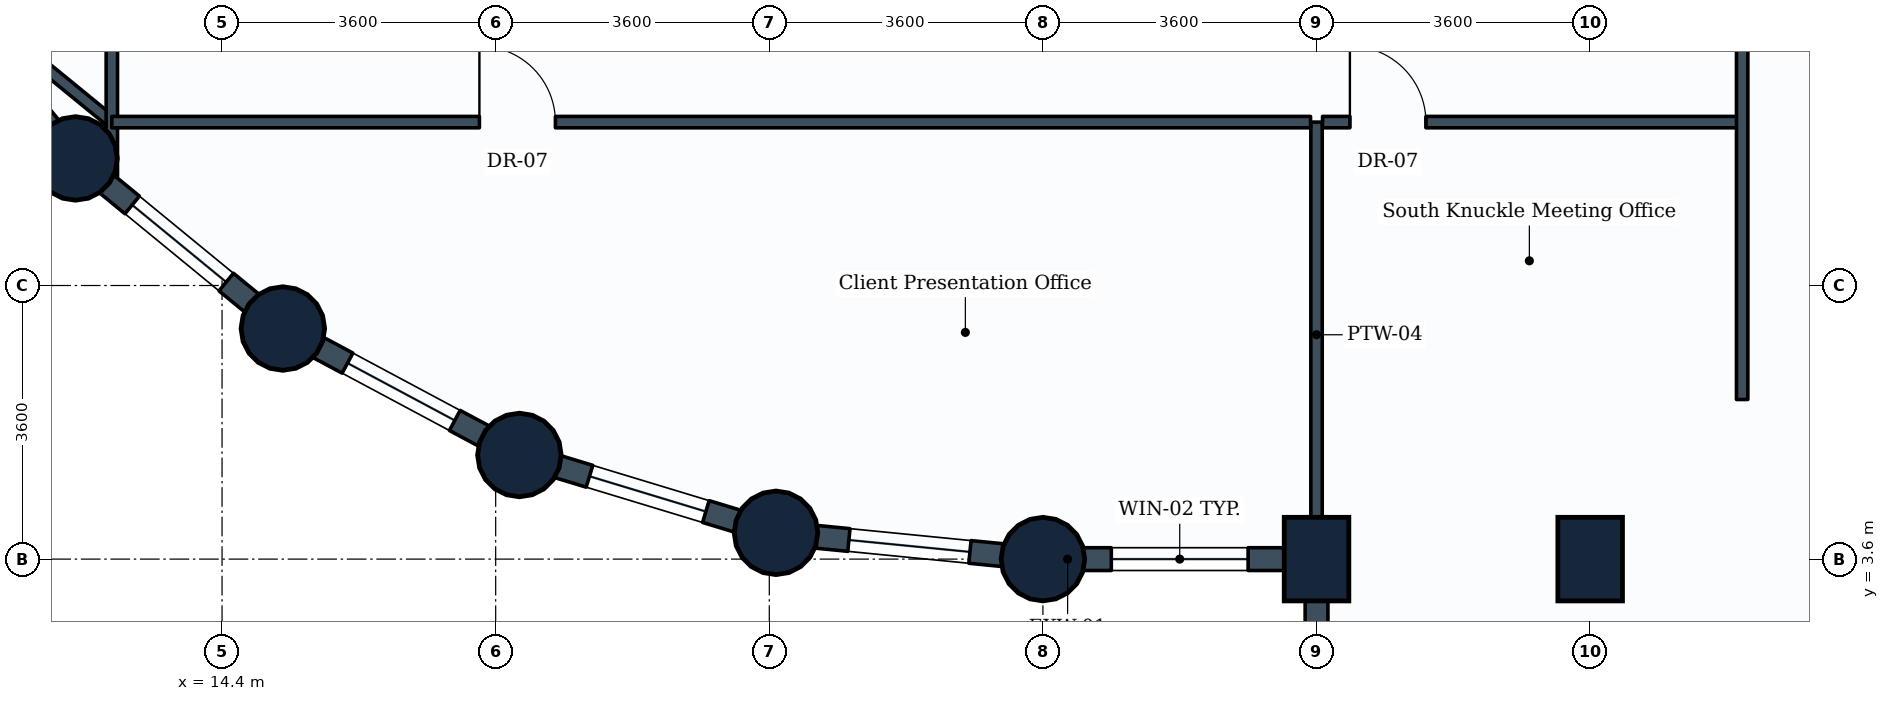
"""IFC4 building model, lengths in metres.
Left out: names, types, materials, properties, quantities, classifications, styles, units other than length and angle.
Written with IfcOpenShell. Run it as: python <this file> out.ifc"""

import sys

from ifc_helpers import new_model, si_unit, direction, frame, frame_2d, origin, origin_2d, place, context, subcontext, project, spatial, rectangle, circle, extrude, element, fill, save


model = new_model("IFC4")
c1 = context("Model", 3, precision=1e-05, world=origin(), true_north=direction((0.0, 1.0)))
c2 = subcontext(c1, "Body", "Model", "MODEL_VIEW")
j1 = project(units=[si_unit("LENGTHUNIT", "METRE"), si_unit("PLANEANGLEUNIT", "RADIAN")], contexts=[c1])
p1 = place(None, origin())
s1 = spatial("IfcSite", under=j1, at=p1, CompositionType="ELEMENT")
p2 = place(p1, origin())
s2 = spatial("IfcBuilding", under=s1, at=p2, CompositionType="ELEMENT")
p3 = place(p2, frame((0.0, 0.0, 95.7)))
s3 = spatial("IfcBuildingStorey", under=s2, at=p3, CompositionType="ELEMENT", Elevation=95.7)
for number, where, z_axis, x_axis in (
    (1, (12.472, 8.872, 0.0), (0.0, 0.0, 1.0), (1.0, 0.0, 0.0)),
    (2, (15.2, 6.634, 0.0), (0.0, 0.0, 1.0), (1.0, 0.0, 0.0)),
    (3, (18.312, 4.97, 0.0), (0.0, 0.0, 1.0), (1.0, 0.0, 0.0)),
    (4, (21.688, 3.946, 0.0), (0.0, 0.0, 1.0), (1.0, 0.0, 0.0)),
    (5, (25.2, 3.6, 0.0), (0.0, 0.0, 1.0), (1.0, 0.0, 0.0)),
):
    element("IfcColumn", number, at=place(p3, frame(where, z_axis=z_axis, x_axis=x_axis)), inside=s3, PredefinedType="COLUMN", context=c2, shape_type="SweptSolid", body=[
        extrude(circle(Radius=0.55, at=origin_2d()), origin(), (0.0, 0.0, 1.0), 3.9),
    ])
for number, where, z_axis, x_axis in (
    (6, (28.8, 3.6, 0.0), (0.0, 0.0, 1.0), (1.0, 0.0, 0.0)),
    (7, (32.4, 3.6, 0.0), (0.0, 0.0, 1.0), (1.0, 0.0, 0.0)),
):
    element("IfcColumn", number, at=place(p3, frame(where, z_axis=z_axis, x_axis=x_axis)), inside=s3, PredefinedType="COLUMN", context=c2, shape_type="SweptSolid", body=[
        extrude(rectangle(XDim=0.85, YDim=1.1, at=origin_2d()), origin(), (0.0, 0.0, 1.0), 3.9),
    ])
p4 = place(p3, frame((28.8, 3.6, 0.0), z_axis=(0.0, 0.0, 1.0), x_axis=(-1.0, 0.0, 0.0)))
e8 = element("IfcWall", 8, at=p4, inside=s3, PredefinedType="STANDARD", context=c2, shape_type="SweptSolid", body=[
    extrude(rectangle(XDim=3.6, YDim=0.3, at=frame_2d((1.8, 0.0))), origin(), (0.0, 0.0, 1.0), 2.93),
])
p5 = place(p4, frame((0.9, 0.0, 0.85)))
e9 = element("IfcOpeningElement", 9, at=p5, cuts=e8, PredefinedType="OPENING", context=c2, shape_type="SweptSolid", body=[
    extrude(rectangle(XDim=1.8, YDim=1.35, at=frame_2d((0.9, 0.675))), frame((0.0, 0.16, 0.0), z_axis=(0.0, -1.0, 0.0), x_axis=(1.0, 0.0, 0.0)), (0.0, 0.0, 1.0), 0.32),
])
p6 = place(p3, frame((28.8, 3.6, 0.0), z_axis=(0.0, 0.0, 1.0), x_axis=(0.0, -1.0, 0.0)))
e10 = element("IfcWall", 10, at=p6, inside=s3, PredefinedType="STANDARD", context=c2, shape_type="SweptSolid", body=[
    extrude(rectangle(XDim=2.1, YDim=0.3, at=frame_2d((1.05, 0.0))), origin(), (0.0, 0.0, 1.0), 2.93),
])
p7 = place(p3, frame((12.472, 8.872, 0.0), z_axis=(0.0, 0.0, 1.0), x_axis=(-0.634258295121, 0.773121216285, 0.0)))
e11 = element("IfcWall", 11, at=p7, inside=s3, PredefinedType="STANDARD", context=c2, shape_type="SweptSolid", body=[
    extrude(rectangle(XDim=3.529, YDim=0.3, at=frame_2d((1.764, 0.0))), origin(), (0.0, 0.0, 1.0), 2.93),
])
p8 = place(p3, frame((15.2, 6.634, 0.0), z_axis=(0.0, 0.0, 1.0), x_axis=(-0.773121216285, 0.634258295121, 0.0)))
e12 = element("IfcWall", 12, at=p8, inside=s3, PredefinedType="STANDARD", context=c2, shape_type="SweptSolid", body=[
    extrude(rectangle(XDim=3.529, YDim=0.3, at=frame_2d((1.764, 0.0))), origin(), (0.0, 0.0, 1.0), 2.93),
])
p9 = place(p8, frame((0.964, 0.0, 0.85)))
e13 = element("IfcOpeningElement", 13, at=p9, cuts=e12, PredefinedType="OPENING", context=c2, shape_type="SweptSolid", body=[
    extrude(rectangle(XDim=1.6, YDim=1.35, at=frame_2d((0.8, 0.675))), frame((0.0, 0.16, 0.0), z_axis=(0.0, -1.0, 0.0), x_axis=(1.0, 0.0, 0.0)), (0.0, 0.0, 1.0), 0.32),
])
p10 = place(p3, frame((18.312, 4.97, 0.0), z_axis=(0.0, 0.0, 1.0), x_axis=(-0.881846862014, 0.471535907389, 0.0)))
e14 = element("IfcWall", 14, at=p10, inside=s3, PredefinedType="STANDARD", context=c2, shape_type="SweptSolid", body=[
    extrude(rectangle(XDim=3.529, YDim=0.3, at=frame_2d((1.765, 0.0))), origin(), (0.0, 0.0, 1.0), 2.93),
])
p11 = place(p10, frame((0.964, 0.0, 0.85)))
e15 = element("IfcOpeningElement", 15, at=p11, cuts=e14, PredefinedType="OPENING", context=c2, shape_type="SweptSolid", body=[
    extrude(rectangle(XDim=1.6, YDim=1.35, at=frame_2d((0.8, 0.675))), frame((0.0, 0.16, 0.0), z_axis=(0.0, -1.0, 0.0), x_axis=(1.0, 0.0, 0.0)), (0.0, 0.0, 1.0), 0.32),
])
p12 = place(p3, frame((21.688, 3.946, 0.0), z_axis=(0.0, 0.0, 1.0), x_axis=(-0.956953367403, 0.290241714123, 0.0)))
e16 = element("IfcWall", 16, at=p12, inside=s3, PredefinedType="STANDARD", context=c2, shape_type="SweptSolid", body=[
    extrude(rectangle(XDim=3.528, YDim=0.3, at=frame_2d((1.764, 0.0))), origin(), (0.0, 0.0, 1.0), 2.93),
])
p13 = place(p12, frame((0.964, 0.0, 0.85)))
e17 = element("IfcOpeningElement", 17, at=p13, cuts=e16, PredefinedType="OPENING", context=c2, shape_type="SweptSolid", body=[
    extrude(rectangle(XDim=1.6, YDim=1.35, at=frame_2d((0.8, 0.675))), frame((0.0, 0.16, 0.0), z_axis=(0.0, -1.0, 0.0), x_axis=(1.0, 0.0, 0.0)), (0.0, 0.0, 1.0), 0.32),
])
p14 = place(p3, frame((25.2, 3.6, 0.0), z_axis=(0.0, 0.0, 1.0), x_axis=(-0.995183369056, 0.098030923459, 0.0)))
e18 = element("IfcWall", 18, at=p14, inside=s3, PredefinedType="STANDARD", context=c2, shape_type="SweptSolid", body=[
    extrude(rectangle(XDim=3.529, YDim=0.3, at=frame_2d((1.765, 0.0))), origin(), (0.0, 0.0, 1.0), 2.93),
])
p15 = place(p14, frame((0.965, 0.0, 0.85)))
e19 = element("IfcOpeningElement", 19, at=p15, cuts=e18, PredefinedType="OPENING", context=c2, shape_type="SweptSolid", body=[
    extrude(rectangle(XDim=1.6, YDim=1.35, at=frame_2d((0.8, 0.675))), frame((0.0, 0.16, 0.0), z_axis=(0.0, -1.0, 0.0), x_axis=(1.0, 0.0, 0.0)), (0.0, 0.0, 1.0), 0.32),
])
p16 = place(p3, frame((28.8, 9.35, 0.0), z_axis=(0.0, 0.0, 1.0), x_axis=(0.0, -1.0, 0.0)))
e20 = element("IfcWall", 20, at=p16, inside=s3, PredefinedType="PARTITIONING", context=c2, shape_type="SweptSolid", body=[
    extrude(rectangle(XDim=5.596, YDim=0.15, at=frame_2d((2.798, 0.0))), origin(), (0.0, 0.0, 1.0), 3.635),
])
p17 = place(p3, frame((12.95, 9.35, 0.0), z_axis=(0.0, 0.0, 1.0), x_axis=(-0.774315108081, 0.632800216022, 0.0)))
e21 = element("IfcWall", 21, at=p17, inside=s3, PredefinedType="PARTITIONING", context=c2, shape_type="SweptSolid", body=[
    extrude(rectangle(XDim=2.37, YDim=0.15, at=frame_2d((1.185, 0.0))), origin(), (0.0, 0.0, 1.0), 2.93),
])
p18 = place(p3, frame((12.95, 8.634, 0.0), z_axis=(0.0, 0.0, 1.0), x_axis=(0.0, 1.0, 0.0)))
e22 = element("IfcWall", 22, at=p18, inside=s3, PredefinedType="PARTITIONING", context=c2, shape_type="SweptSolid", body=[
    extrude(rectangle(XDim=7.887, YDim=0.15, at=frame_2d((3.944, 0.0))), origin(), (0.0, 0.0, 1.0), 2.93),
])
p19 = place(p18, frame((4.947, 0.0, 0.0)))
e23 = element("IfcOpeningElement", 23, at=p19, cuts=e22, PredefinedType="OPENING", context=c2, shape_type="SweptSolid", body=[
    extrude(rectangle(XDim=1.0, YDim=2.1, at=frame_2d((0.5, 1.05))), frame((0.0, 0.085, 0.0), z_axis=(0.0, -1.0, 0.0), x_axis=(1.0, 0.0, 0.0)), (0.0, 0.0, 1.0), 0.17),
])
p20 = place(p3, frame((12.95, 9.35, 0.0), z_axis=(0.0, 0.0, 1.0), x_axis=(1.0, 0.0, 0.0)))
e24 = element("IfcWall", 24, at=p20, inside=s3, PredefinedType="PARTITIONING", context=c2, shape_type="SweptSolid", body=[
    extrude(rectangle(XDim=15.771, YDim=0.15, at=frame_2d((7.885, 0.0))), origin(), (0.0, 0.0, 1.0), 3.18),
])
p21 = place(p20, frame((4.836, 0.0, 0.0)))
e25 = element("IfcOpeningElement", 25, at=p21, cuts=e24, PredefinedType="OPENING", context=c2, shape_type="SweptSolid", body=[
    extrude(rectangle(XDim=1.0, YDim=2.1, at=frame_2d((0.5, 1.05))), frame((0.0, 0.085, 0.0), z_axis=(0.0, -1.0, 0.0), x_axis=(1.0, 0.0, 0.0)), (0.0, 0.0, 1.0), 0.17),
])
p22 = place(p3, frame((28.879, 9.35, 0.0), z_axis=(0.0, 0.0, 1.0), x_axis=(1.0, 0.0, 0.0)))
e26 = element("IfcWall", 26, at=p22, inside=s3, PredefinedType="PARTITIONING", context=c2, shape_type="SweptSolid", body=[
    extrude(rectangle(XDim=5.521, YDim=0.15, at=frame_2d((2.76, 0.0))), origin(), (0.0, 0.0, 1.0), 3.635),
])
p23 = place(p22, frame((0.36, 0.0, 0.0)))
e27 = element("IfcOpeningElement", 27, at=p23, cuts=e26, PredefinedType="OPENING", context=c2, shape_type="SweptSolid", body=[
    extrude(rectangle(XDim=1.0, YDim=2.1, at=frame_2d((0.5, 1.05))), frame((0.0, 0.085, 0.0), z_axis=(0.0, -1.0, 0.0), x_axis=(1.0, 0.0, 0.0)), (0.0, 0.0, 1.0), 0.17),
])
p24 = place(p3, frame((34.4, 5.7, 0.0), z_axis=(0.0, 0.0, 1.0), x_axis=(0.0, 1.0, 0.0)))
e28 = element("IfcWall", 28, at=p24, inside=s3, PredefinedType="PARTITIONING", context=c2, shape_type="SweptSolid", body=[
    extrude(rectangle(XDim=12.15, YDim=0.15, at=frame_2d((6.075, 0.0))), origin(), (0.0, 0.0, 1.0), 3.18),
])
p25 = place(p5, origin())
e29 = element("IfcWindow", 29, at=p25, inside=s3, PartitioningType="SINGLE_PANEL", PredefinedType="WINDOW", context=c2, shape_type="SweptSolid", body=[
    extrude(rectangle(XDim=1.8, YDim=1.35, at=frame_2d((0.9, 0.675))), frame((0.0, 0.03, 0.0), z_axis=(0.0, -1.0, 0.0), x_axis=(1.0, 0.0, 0.0)), (0.0, 0.0, 1.0), 0.06),
])
fill(e9, e29)
p26 = place(p9, origin())
e30 = element("IfcWindow", 30, at=p26, inside=s3, PartitioningType="SINGLE_PANEL", PredefinedType="WINDOW", context=c2, shape_type="SweptSolid", body=[
    extrude(rectangle(XDim=1.6, YDim=1.35, at=frame_2d((0.8, 0.675))), frame((0.0, 0.03, 0.0), z_axis=(0.0, -1.0, 0.0), x_axis=(1.0, 0.0, 0.0)), (0.0, 0.0, 1.0), 0.06),
])
fill(e13, e30)
p27 = place(p11, origin())
e31 = element("IfcWindow", 31, at=p27, inside=s3, PartitioningType="SINGLE_PANEL", PredefinedType="WINDOW", context=c2, shape_type="SweptSolid", body=[
    extrude(rectangle(XDim=1.6, YDim=1.35, at=frame_2d((0.8, 0.675))), frame((0.0, 0.03, 0.0), z_axis=(0.0, -1.0, 0.0), x_axis=(1.0, 0.0, 0.0)), (0.0, 0.0, 1.0), 0.06),
])
fill(e15, e31)
p28 = place(p13, origin())
e32 = element("IfcWindow", 32, at=p28, inside=s3, PartitioningType="SINGLE_PANEL", PredefinedType="WINDOW", context=c2, shape_type="SweptSolid", body=[
    extrude(rectangle(XDim=1.6, YDim=1.35, at=frame_2d((0.8, 0.675))), frame((0.0, 0.03, 0.0), z_axis=(0.0, -1.0, 0.0), x_axis=(1.0, 0.0, 0.0)), (0.0, 0.0, 1.0), 0.06),
])
fill(e17, e32)
p29 = place(p15, origin())
e33 = element("IfcWindow", 33, at=p29, inside=s3, PartitioningType="SINGLE_PANEL", PredefinedType="WINDOW", context=c2, shape_type="SweptSolid", body=[
    extrude(rectangle(XDim=1.6, YDim=1.35, at=frame_2d((0.8, 0.675))), frame((0.0, 0.03, 0.0), z_axis=(0.0, -1.0, 0.0), x_axis=(1.0, 0.0, 0.0)), (0.0, 0.0, 1.0), 0.06),
])
fill(e19, e33)
p30 = place(p21, origin())
e34 = element("IfcDoor", 34, at=p30, inside=s3, OperationType="SINGLE_SWING_LEFT", PredefinedType="DOOR", context=c2, shape_type="SweptSolid", body=[
    extrude(rectangle(XDim=1.0, YDim=2.1, at=frame_2d((0.5, 1.05))), frame((0.0, 0.025, 0.0), z_axis=(0.0, -1.0, 0.0), x_axis=(1.0, 0.0, 0.0)), (0.0, 0.0, 1.0), 0.05),
])
fill(e25, e34)
p31 = place(p23, origin())
e35 = element("IfcDoor", 35, at=p31, inside=s3, OperationType="SINGLE_SWING_LEFT", PredefinedType="DOOR", context=c2, shape_type="SweptSolid", body=[
    extrude(rectangle(XDim=1.0, YDim=2.1, at=frame_2d((0.5, 1.05))), frame((0.0, 0.025, 0.0), z_axis=(0.0, -1.0, 0.0), x_axis=(1.0, 0.0, 0.0)), (0.0, 0.0, 1.0), 0.05),
])
fill(e27, e35)
save(model, sys.argv[1])
